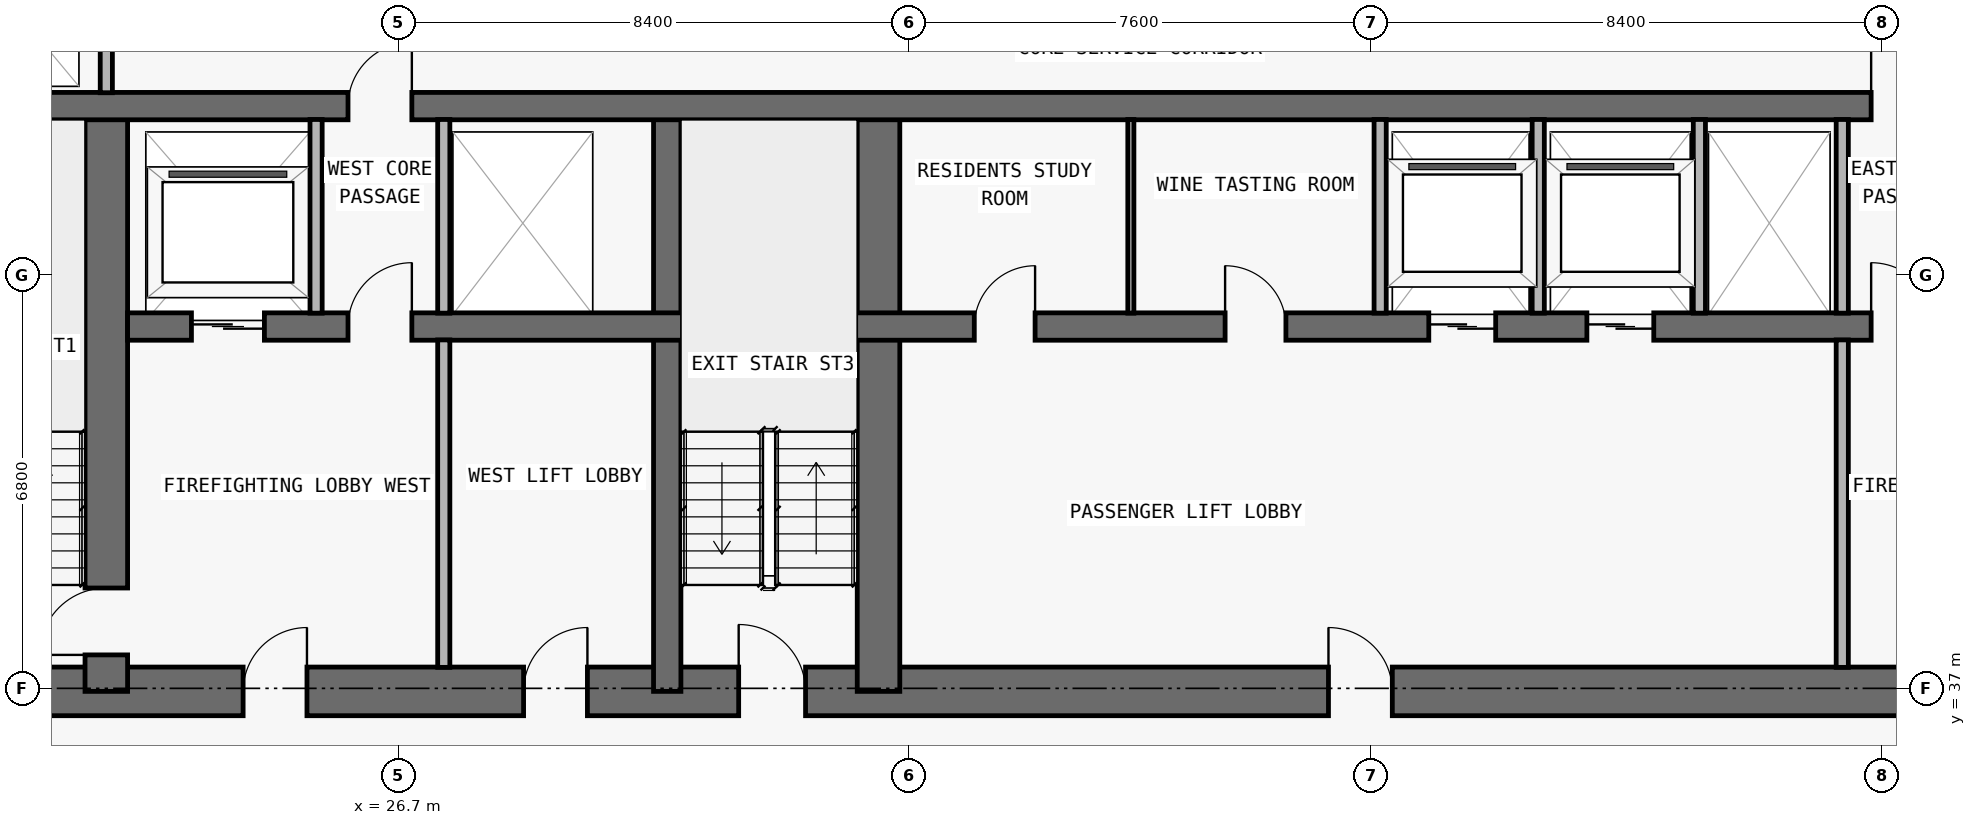
"""IFC4 building model, lengths in metres.
Left out: names, types, materials, properties, quantities, classifications, styles, units other than length and angle.
Written with IfcOpenShell. Run it as: python <this file> out.ifc"""

import sys

from ifc_helpers import new_model, si_unit, direction, frame, frame_2d, origin, place, context, subcontext, project, spatial, rectangle, extrude, element, fill, save


model = new_model("IFC4")
c1 = context("Model", 3, precision=1e-05, world=origin(), true_north=direction((0.0, 1.0)))
c2 = subcontext(c1, "Body", "Model", "MODEL_VIEW")
j1 = project(units=[si_unit("LENGTHUNIT", "METRE"), si_unit("PLANEANGLEUNIT", "RADIAN")], contexts=[c1])
p1 = place(None, origin())
s1 = spatial("IfcSite", under=j1, at=p1, CompositionType="ELEMENT")
p2 = place(p1, origin())
s2 = spatial("IfcBuilding", under=s1, at=p2, CompositionType="ELEMENT")
p3 = place(p2, frame((0.0, 0.0, 105.9)))
s3 = spatial("IfcBuildingStorey", under=s2, at=p3, CompositionType="ELEMENT", Elevation=105.9)
p4 = place(p3, frame((17.85, 36.95, 0.0), z_axis=(0.0, 0.0, 1.0), x_axis=(1.0, 0.0, 0.0)))
e1 = element("IfcWall", 1, at=p4, inside=s3, PredefinedType="SHEAR", context=c2, shape_type="SweptSolid", body=[
    extrude(rectangle(XDim=42.1, YDim=0.8, at=frame_2d((21.05, 0.0))), origin(), (0.0, 0.0, 1.0), 3.05),
])
p5 = place(p4, frame((14.45, 0.0, 0.0)))
e2 = element("IfcOpeningElement", 2, at=p5, cuts=e1, PredefinedType="OPENING", context=c2, shape_type="SweptSolid", body=[
    extrude(rectangle(XDim=1.1, YDim=2.15, at=frame_2d((0.55, 1.075))), frame((0.0, 0.41, 0.0), z_axis=(0.0, -1.0, 0.0), x_axis=(1.0, 0.0, 0.0)), (0.0, 0.0, 1.0), 0.82),
])
p6 = place(p4, frame((6.3, 0.0, 0.0)))
e3 = element("IfcOpeningElement", 3, at=p6, cuts=e1, PredefinedType="OPENING", context=c2, shape_type="SweptSolid", body=[
    extrude(rectangle(XDim=1.05, YDim=2.15, at=frame_2d((0.525, 1.075))), frame((0.0, 0.41, 0.0), z_axis=(0.0, -1.0, 0.0), x_axis=(1.0, 0.0, 0.0)), (0.0, 0.0, 1.0), 0.82),
])
p7 = place(p4, frame((34.8, 0.0, 0.0)))
e4 = element("IfcOpeningElement", 4, at=p7, cuts=e1, PredefinedType="OPENING", context=c2, shape_type="SweptSolid", body=[
    extrude(rectangle(XDim=1.05, YDim=2.15, at=frame_2d((0.525, 1.075))), frame((0.0, 0.41, 0.0), z_axis=(0.0, -1.0, 0.0), x_axis=(1.0, 0.0, 0.0)), (0.0, 0.0, 1.0), 0.82),
])
p8 = place(p4, frame((10.913, 0.0, 0.0)))
e5 = element("IfcOpeningElement", 5, at=p8, cuts=e1, PredefinedType="OPENING", context=c2, shape_type="SweptSolid", body=[
    extrude(rectangle(XDim=1.05, YDim=2.15, at=frame_2d((0.525, 1.075))), frame((0.0, 0.41, 0.0), z_axis=(0.0, -1.0, 0.0), x_axis=(1.0, 0.0, 0.0)), (0.0, 0.0, 1.0), 0.82),
])
p9 = place(p4, frame((24.15, 0.0, 0.0)))
e6 = element("IfcOpeningElement", 6, at=p9, cuts=e1, PredefinedType="OPENING", context=c2, shape_type="SweptSolid", body=[
    extrude(rectangle(XDim=1.05, YDim=2.15, at=frame_2d((0.525, 1.075))), frame((0.0, 0.41, 0.0), z_axis=(0.0, -1.0, 0.0), x_axis=(1.0, 0.0, 0.0)), (0.0, 0.0, 1.0), 0.82),
])
p10 = place(p3, frame((21.9, 36.95, 0.0), z_axis=(0.0, 0.0, 1.0), x_axis=(0.0, 1.0, 0.0)))
e7 = element("IfcWall", 7, at=p10, inside=s3, PredefinedType="SHEAR", context=c2, shape_type="SweptSolid", body=[
    extrude(rectangle(XDim=9.625, YDim=0.7, at=frame_2d((4.812, 0.0))), origin(), (0.0, 0.0, 1.0), 3.05),
])
p11 = place(p10, frame((0.6, 0.0, 0.0)))
e8 = element("IfcOpeningElement", 8, at=p11, cuts=e7, PredefinedType="OPENING", context=c2, shape_type="SweptSolid", body=[
    extrude(rectangle(XDim=1.1, YDim=2.15, at=frame_2d((0.55, 1.075))), frame((0.0, 0.36, 0.0), z_axis=(0.0, -1.0, 0.0), x_axis=(1.0, 0.0, 0.0)), (0.0, 0.0, 1.0), 0.72),
])
p12 = place(p3, frame((31.125, 36.95, 0.0), z_axis=(0.0, 0.0, 1.0), x_axis=(0.0, 1.0, 0.0)))
e9 = element("IfcWall", 9, at=p12, inside=s3, PredefinedType="SHEAR", context=c2, shape_type="SweptSolid", body=[
    extrude(rectangle(XDim=9.625, YDim=0.45, at=frame_2d((4.812, 0.0))), origin(), (0.0, 0.0, 1.0), 3.05),
])
p13 = place(p3, frame((34.6, 36.95, 0.0), z_axis=(0.0, 0.0, 1.0), x_axis=(0.0, 1.0, 0.0)))
e10 = element("IfcWall", 10, at=p13, inside=s3, PredefinedType="SHEAR", context=c2, shape_type="SweptSolid", body=[
    extrude(rectangle(XDim=9.625, YDim=0.7, at=frame_2d((4.812, 0.0))), origin(), (0.0, 0.0, 1.0), 3.05),
])
p14 = place(p3, frame((22.25, 42.95, 0.0), z_axis=(0.0, 0.0, 1.0), x_axis=(1.0, 0.0, 0.0)))
e11 = element("IfcWall", 11, at=p14, inside=s3, PredefinedType="SHEAR", context=c2, shape_type="SweptSolid", body=[
    extrude(rectangle(XDim=33.3, YDim=0.45, at=frame_2d((16.65, 0.0))), origin(), (0.0, 0.0, 1.0), 3.05),
])
p15 = place(p14, frame((1.05, 0.0, 0.0)))
e12 = element("IfcOpeningElement", 12, at=p15, cuts=e11, PredefinedType="OPENING", context=c2, shape_type="SweptSolid", body=[
    extrude(rectangle(XDim=1.2, YDim=2.2, at=frame_2d((0.6, 1.1))), frame((0.0, 0.235, 0.0), z_axis=(0.0, -1.0, 0.0), x_axis=(1.0, 0.0, 0.0)), (0.0, 0.0, 1.0), 0.47),
])
p16 = place(p14, frame((31.05, 0.0, 0.0)))
e13 = element("IfcOpeningElement", 13, at=p16, cuts=e11, PredefinedType="OPENING", context=c2, shape_type="SweptSolid", body=[
    extrude(rectangle(XDim=1.2, YDim=2.2, at=frame_2d((0.6, 1.1))), frame((0.0, 0.235, 0.0), z_axis=(0.0, -1.0, 0.0), x_axis=(1.0, 0.0, 0.0)), (0.0, 0.0, 1.0), 0.47),
])
p17 = place(p14, frame((21.4, 0.0, 0.0)))
e14 = element("IfcOpeningElement", 14, at=p17, cuts=e11, PredefinedType="OPENING", context=c2, shape_type="SweptSolid", body=[
    extrude(rectangle(XDim=1.1, YDim=2.2, at=frame_2d((0.55, 1.1))), frame((0.0, 0.235, 0.0), z_axis=(0.0, -1.0, 0.0), x_axis=(1.0, 0.0, 0.0)), (0.0, 0.0, 1.0), 0.47),
])
p18 = place(p14, frame((24.0, 0.0, 0.0)))
e15 = element("IfcOpeningElement", 15, at=p18, cuts=e11, PredefinedType="OPENING", context=c2, shape_type="SweptSolid", body=[
    extrude(rectangle(XDim=1.1, YDim=2.2, at=frame_2d((0.55, 1.1))), frame((0.0, 0.235, 0.0), z_axis=(0.0, -1.0, 0.0), x_axis=(1.0, 0.0, 0.0)), (0.0, 0.0, 1.0), 0.47),
])
p19 = place(p14, frame((3.625, 0.0, 0.0)))
e16 = element("IfcOpeningElement", 16, at=p19, cuts=e11, PredefinedType="OPENING", context=c2, shape_type="SweptSolid", body=[
    extrude(rectangle(XDim=1.05, YDim=2.15, at=frame_2d((0.525, 1.075))), frame((0.0, 0.235, 0.0), z_axis=(0.0, -1.0, 0.0), x_axis=(1.0, 0.0, 0.0)), (0.0, 0.0, 1.0), 0.47),
])
p20 = place(p14, frame((28.675, 0.0, 0.0)))
e17 = element("IfcOpeningElement", 17, at=p20, cuts=e11, PredefinedType="OPENING", context=c2, shape_type="SweptSolid", body=[
    extrude(rectangle(XDim=1.05, YDim=2.15, at=frame_2d((0.525, 1.075))), frame((0.0, 0.235, 0.0), z_axis=(0.0, -1.0, 0.0), x_axis=(1.0, 0.0, 0.0)), (0.0, 0.0, 1.0), 0.47),
])
p21 = place(p14, frame((13.925, 0.0, 0.0)))
e18 = element("IfcOpeningElement", 18, at=p21, cuts=e11, PredefinedType="OPENING", context=c2, shape_type="SweptSolid", body=[
    extrude(rectangle(XDim=1.0, YDim=2.2, at=frame_2d((0.5, 1.1))), frame((0.0, 0.235, 0.0), z_axis=(0.0, -1.0, 0.0), x_axis=(1.0, 0.0, 0.0)), (0.0, 0.0, 1.0), 0.47),
])
p22 = place(p14, frame((18.05, 0.0, 0.0)))
e19 = element("IfcOpeningElement", 19, at=p22, cuts=e11, PredefinedType="OPENING", context=c2, shape_type="SweptSolid", body=[
    extrude(rectangle(XDim=1.0, YDim=2.2, at=frame_2d((0.5, 1.1))), frame((0.0, 0.235, 0.0), z_axis=(0.0, -1.0, 0.0), x_axis=(1.0, 0.0, 0.0)), (0.0, 0.0, 1.0), 0.47),
])
p23 = place(p3, frame((18.25, 46.575, 0.0), z_axis=(0.0, 0.0, 1.0), x_axis=(1.0, 0.0, 0.0)))
e20 = element("IfcWall", 20, at=p23, inside=s3, PredefinedType="SHEAR", context=c2, shape_type="SweptSolid", body=[
    extrude(rectangle(XDim=41.3, YDim=0.45, at=frame_2d((20.65, 0.0))), origin(), (0.0, 0.0, 1.0), 3.05),
])
p24 = place(p23, frame((7.625, 0.0, 0.0)))
e21 = element("IfcOpeningElement", 21, at=p24, cuts=e20, PredefinedType="OPENING", context=c2, shape_type="SweptSolid", body=[
    extrude(rectangle(XDim=1.05, YDim=2.15, at=frame_2d((0.525, 1.075))), frame((0.0, 0.235, 0.0), z_axis=(0.0, -1.0, 0.0), x_axis=(1.0, 0.0, 0.0)), (0.0, 0.0, 1.0), 0.47),
])
p25 = place(p23, frame((32.675, 0.0, 0.0)))
e22 = element("IfcOpeningElement", 22, at=p25, cuts=e20, PredefinedType="OPENING", context=c2, shape_type="SweptSolid", body=[
    extrude(rectangle(XDim=1.05, YDim=2.15, at=frame_2d((0.525, 1.075))), frame((0.0, 0.235, 0.0), z_axis=(0.0, -1.0, 0.0), x_axis=(1.0, 0.0, 0.0)), (0.0, 0.0, 1.0), 0.47),
])
p26 = place(p3, frame((21.9, 46.795, 0.0), z_axis=(0.0, 0.0, 1.0), x_axis=(0.0, 1.0, 0.0)))
e23 = element("IfcWall", 23, at=p26, inside=s3, PredefinedType="PARTITIONING", context=c2, shape_type="SweptSolid", body=[
    extrude(rectangle(XDim=3.16, YDim=0.2, at=frame_2d((1.58, 0.0))), origin(), (0.0, 0.0, 1.0), 3.05),
])
p27 = place(p3, frame((25.35, 43.17, 0.0), z_axis=(0.0, 0.0, 1.0), x_axis=(0.0, 1.0, 0.0)))
e24 = element("IfcWall", 24, at=p27, inside=s3, PredefinedType="PARTITIONING", context=c2, shape_type="SweptSolid", body=[
    extrude(rectangle(XDim=3.185, YDim=0.2, at=frame_2d((1.593, 0.0))), origin(), (0.0, 0.0, 1.0), 3.05),
])
p28 = place(p3, frame((27.45, 37.345, 0.0), z_axis=(0.0, 0.0, 1.0), x_axis=(0.0, 1.0, 0.0)))
e25 = element("IfcWall", 25, at=p28, inside=s3, PredefinedType="PARTITIONING", context=c2, shape_type="SweptSolid", body=[
    extrude(rectangle(XDim=5.385, YDim=0.2, at=frame_2d((2.692, 0.0))), origin(), (0.0, 0.0, 1.0), 3.05),
])
p29 = place(p3, frame((27.45, 43.17, 0.0), z_axis=(0.0, 0.0, 1.0), x_axis=(0.0, 1.0, 0.0)))
e26 = element("IfcWall", 26, at=p29, inside=s3, PredefinedType="PARTITIONING", context=c2, shape_type="SweptSolid", body=[
    extrude(rectangle(XDim=3.185, YDim=0.2, at=frame_2d((1.593, 0.0))), origin(), (0.0, 0.0, 1.0), 3.05),
])
p30 = place(p3, frame((38.75, 43.17, 0.0), z_axis=(0.0, 0.0, 1.0), x_axis=(0.0, 1.0, 0.0)))
e27 = element("IfcWall", 27, at=p30, inside=s3, PredefinedType="MOVABLE", context=c2, shape_type="SweptSolid", body=[
    extrude(rectangle(XDim=3.185, YDim=0.1, at=frame_2d((1.593, 0.0))), origin(), (0.0, 0.0, 1.0), 3.05),
])
for number, where, z_axis, x_axis in (
    (28, (42.85, 43.17, 0.0), (0.0, 0.0, 1.0), (0.0, 1.0, 0.0)),
    (29, (45.45, 43.17, 0.0), (0.0, 0.0, 1.0), (0.0, 1.0, 0.0)),
    (30, (48.1, 43.17, 0.0), (0.0, 0.0, 1.0), (0.0, 1.0, 0.0)),
):
    element("IfcWall", number, at=place(p3, frame(where, z_axis=z_axis, x_axis=x_axis)), inside=s3, PredefinedType="PARTITIONING", context=c2, shape_type="SweptSolid", body=[
        extrude(rectangle(XDim=3.185, YDim=0.2, at=frame_2d((1.593, 0.0))), origin(), (0.0, 0.0, 1.0), 3.05),
    ])
p31 = place(p3, frame((50.45, 37.345, 0.0), z_axis=(0.0, 0.0, 1.0), x_axis=(0.0, 1.0, 0.0)))
e31 = element("IfcWall", 31, at=p31, inside=s3, PredefinedType="PARTITIONING", context=c2, shape_type="SweptSolid", body=[
    extrude(rectangle(XDim=5.385, YDim=0.2, at=frame_2d((2.692, 0.0))), origin(), (0.0, 0.0, 1.0), 3.05),
])
p32 = place(p3, frame((50.45, 43.17, 0.0), z_axis=(0.0, 0.0, 1.0), x_axis=(0.0, 1.0, 0.0)))
e32 = element("IfcWall", 32, at=p32, inside=s3, PredefinedType="PARTITIONING", context=c2, shape_type="SweptSolid", body=[
    extrude(rectangle(XDim=3.185, YDim=0.2, at=frame_2d((1.593, 0.0))), origin(), (0.0, 0.0, 1.0), 3.05),
])
p33 = place(p15, origin())
e33 = element("IfcDoor", 33, at=p33, inside=s3, OperationType="DOUBLE_DOOR_SLIDING", PredefinedType="DOOR", context=c2, shape_type="SweptSolid", body=[
    extrude(rectangle(XDim=1.2, YDim=2.2, at=frame_2d((0.6, 1.1))), frame((0.0, 0.025, 0.0), z_axis=(0.0, -1.0, 0.0), x_axis=(1.0, 0.0, 0.0)), (0.0, 0.0, 1.0), 0.05),
])
fill(e12, e33)
p34 = place(p17, origin())
e34 = element("IfcDoor", 34, at=p34, inside=s3, OperationType="DOUBLE_DOOR_SLIDING", PredefinedType="DOOR", context=c2, shape_type="SweptSolid", body=[
    extrude(rectangle(XDim=1.1, YDim=2.2, at=frame_2d((0.55, 1.1))), frame((0.0, 0.025, 0.0), z_axis=(0.0, -1.0, 0.0), x_axis=(1.0, 0.0, 0.0)), (0.0, 0.0, 1.0), 0.05),
])
fill(e14, e34)
p35 = place(p18, origin())
e35 = element("IfcDoor", 35, at=p35, inside=s3, OperationType="DOUBLE_DOOR_SLIDING", PredefinedType="DOOR", context=c2, shape_type="SweptSolid", body=[
    extrude(rectangle(XDim=1.1, YDim=2.2, at=frame_2d((0.55, 1.1))), frame((0.0, 0.025, 0.0), z_axis=(0.0, -1.0, 0.0), x_axis=(1.0, 0.0, 0.0)), (0.0, 0.0, 1.0), 0.05),
])
fill(e15, e35)
p36 = place(p5, origin())
e36 = element("IfcDoor", 36, at=p36, inside=s3, OperationType="SINGLE_SWING_LEFT", PredefinedType="DOOR", context=c2, shape_type="SweptSolid", body=[
    extrude(rectangle(XDim=1.1, YDim=2.15, at=frame_2d((0.55, 1.075))), frame((0.0, 0.025, 0.0), z_axis=(0.0, -1.0, 0.0), x_axis=(1.0, 0.0, 0.0)), (0.0, 0.0, 1.0), 0.05),
])
fill(e2, e36)
p37 = place(p6, origin())
e37 = element("IfcDoor", 37, at=p37, inside=s3, OperationType="SINGLE_SWING_RIGHT", PredefinedType="DOOR", context=c2, shape_type="SweptSolid", body=[
    extrude(rectangle(XDim=1.05, YDim=2.15, at=frame_2d((0.525, 1.075))), frame((0.0, 0.025, 0.0), z_axis=(0.0, -1.0, 0.0), x_axis=(1.0, 0.0, 0.0)), (0.0, 0.0, 1.0), 0.05),
])
fill(e3, e37)
p38 = place(p11, origin())
e38 = element("IfcDoor", 38, at=p38, inside=s3, OperationType="SINGLE_SWING_LEFT", PredefinedType="DOOR", context=c2, shape_type="SweptSolid", body=[
    extrude(rectangle(XDim=1.1, YDim=2.15, at=frame_2d((0.55, 1.075))), frame((0.0, 0.025, 0.0), z_axis=(0.0, -1.0, 0.0), x_axis=(1.0, 0.0, 0.0)), (0.0, 0.0, 1.0), 0.05),
])
fill(e8, e38)
p39 = place(p19, origin())
e39 = element("IfcDoor", 39, at=p39, inside=s3, OperationType="SINGLE_SWING_RIGHT", PredefinedType="DOOR", context=c2, shape_type="SweptSolid", body=[
    extrude(rectangle(XDim=1.05, YDim=2.15, at=frame_2d((0.525, 1.075))), frame((0.0, 0.025, 0.0), z_axis=(0.0, -1.0, 0.0), x_axis=(1.0, 0.0, 0.0)), (0.0, 0.0, 1.0), 0.05),
])
fill(e16, e39)
p40 = place(p20, origin())
e40 = element("IfcDoor", 40, at=p40, inside=s3, OperationType="SINGLE_SWING_LEFT", PredefinedType="DOOR", context=c2, shape_type="SweptSolid", body=[
    extrude(rectangle(XDim=1.05, YDim=2.15, at=frame_2d((0.525, 1.075))), frame((0.0, 0.025, 0.0), z_axis=(0.0, -1.0, 0.0), x_axis=(1.0, 0.0, 0.0)), (0.0, 0.0, 1.0), 0.05),
])
fill(e17, e40)
p41 = place(p8, origin())
e41 = element("IfcDoor", 41, at=p41, inside=s3, OperationType="SINGLE_SWING_RIGHT", PredefinedType="DOOR", context=c2, shape_type="SweptSolid", body=[
    extrude(rectangle(XDim=1.05, YDim=2.15, at=frame_2d((0.525, 1.075))), frame((0.0, 0.025, 0.0), z_axis=(0.0, -1.0, 0.0), x_axis=(1.0, 0.0, 0.0)), (0.0, 0.0, 1.0), 0.05),
])
fill(e5, e41)
p42 = place(p9, origin())
e42 = element("IfcDoor", 42, at=p42, inside=s3, OperationType="SINGLE_SWING_LEFT", PredefinedType="DOOR", context=c2, shape_type="SweptSolid", body=[
    extrude(rectangle(XDim=1.05, YDim=2.15, at=frame_2d((0.525, 1.075))), frame((0.0, 0.025, 0.0), z_axis=(0.0, -1.0, 0.0), x_axis=(1.0, 0.0, 0.0)), (0.0, 0.0, 1.0), 0.05),
])
fill(e6, e42)
p43 = place(p21, origin())
e43 = element("IfcDoor", 43, at=p43, inside=s3, OperationType="SINGLE_SWING_RIGHT", PredefinedType="DOOR", context=c2, shape_type="SweptSolid", body=[
    extrude(rectangle(XDim=1.0, YDim=2.2, at=frame_2d((0.5, 1.1))), frame((0.0, 0.025, 0.0), z_axis=(0.0, -1.0, 0.0), x_axis=(1.0, 0.0, 0.0)), (0.0, 0.0, 1.0), 0.05),
])
fill(e18, e43)
p44 = place(p22, origin())
e44 = element("IfcDoor", 44, at=p44, inside=s3, OperationType="SINGLE_SWING_LEFT", PredefinedType="DOOR", context=c2, shape_type="SweptSolid", body=[
    extrude(rectangle(XDim=1.0, YDim=2.2, at=frame_2d((0.5, 1.1))), frame((0.0, 0.025, 0.0), z_axis=(0.0, -1.0, 0.0), x_axis=(1.0, 0.0, 0.0)), (0.0, 0.0, 1.0), 0.05),
])
fill(e19, e44)
p45 = place(p24, origin())
e45 = element("IfcDoor", 45, at=p45, inside=s3, OperationType="SINGLE_SWING_RIGHT", PredefinedType="DOOR", context=c2, shape_type="SweptSolid", body=[
    extrude(rectangle(XDim=1.05, YDim=2.15, at=frame_2d((0.525, 1.075))), frame((0.0, 0.025, 0.0), z_axis=(0.0, -1.0, 0.0), x_axis=(1.0, 0.0, 0.0)), (0.0, 0.0, 1.0), 0.05),
])
fill(e21, e45)
p46 = place(p25, origin())
e46 = element("IfcDoor", 46, at=p46, inside=s3, OperationType="SINGLE_SWING_LEFT", PredefinedType="DOOR", context=c2, shape_type="SweptSolid", body=[
    extrude(rectangle(XDim=1.05, YDim=2.15, at=frame_2d((0.525, 1.075))), frame((0.0, 0.025, 0.0), z_axis=(0.0, -1.0, 0.0), x_axis=(1.0, 0.0, 0.0)), (0.0, 0.0, 1.0), 0.05),
])
fill(e22, e46)
save(model, sys.argv[1])
